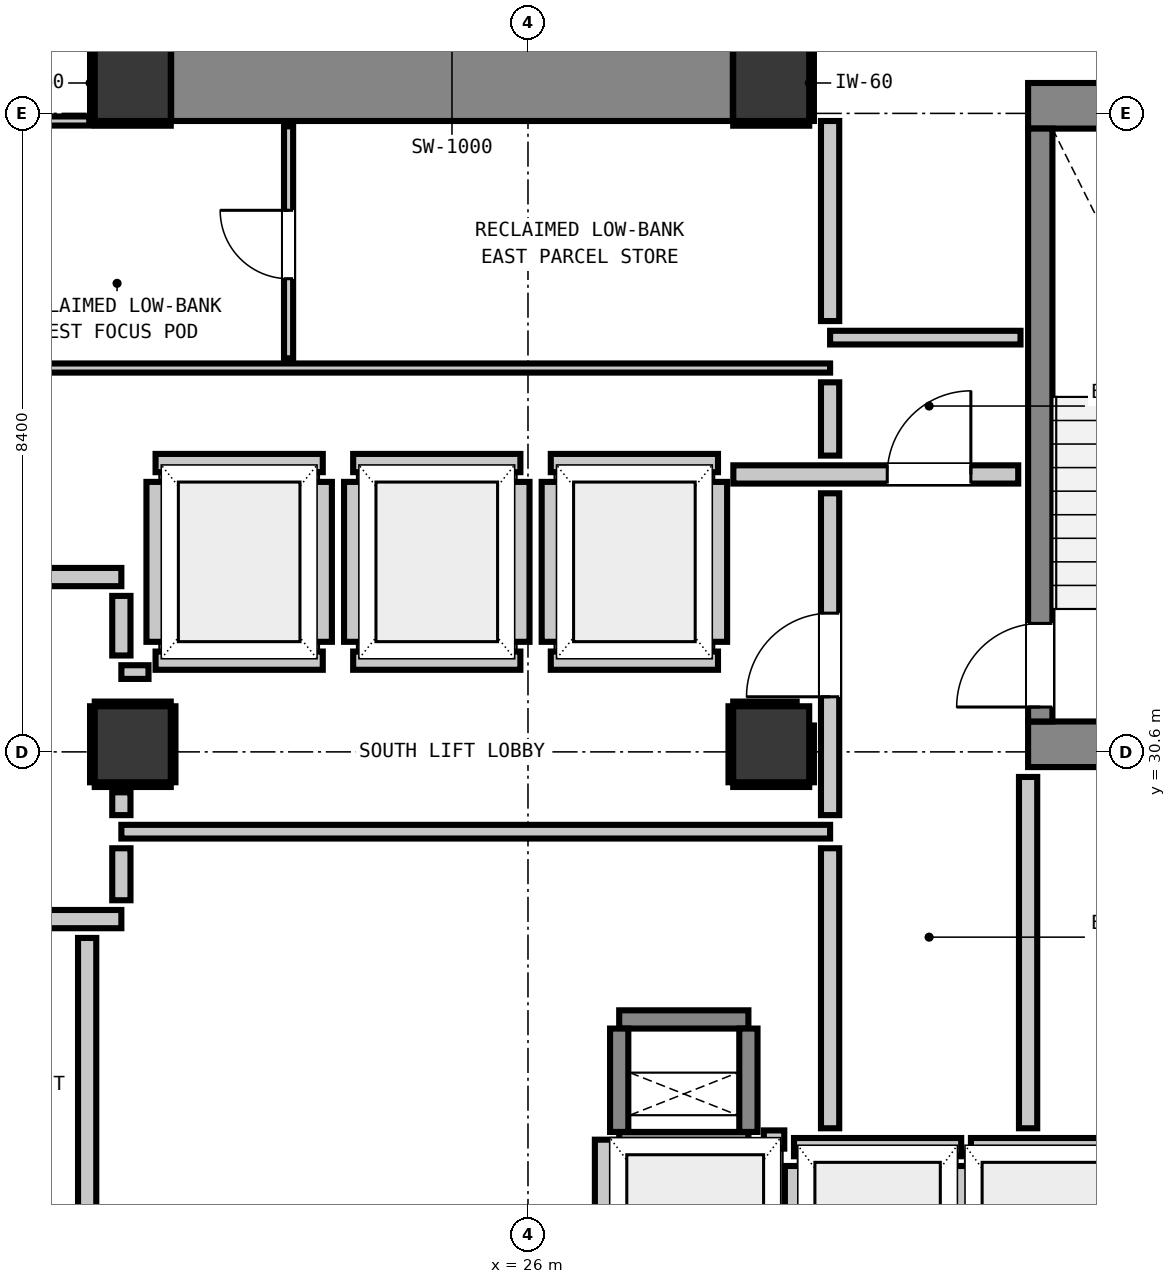
"""IFC4 building model, lengths in metres.
Left out: names, types, materials, properties, quantities, classifications, styles, units other than length and angle.
Written with IfcOpenShell. Run it as: python <this file> out.ifc"""

import sys

from ifc_helpers import new_model, si_unit, direction, frame, frame_2d, origin, origin_2d, place, context, subcontext, project, spatial, rectangle, extrude, element, fill, save


model = new_model("IFC4")
c1 = context("Model", 3, precision=1e-05, world=origin(), true_north=direction((0.0, 1.0)))
c2 = subcontext(c1, "Body", "Model", "MODEL_VIEW")
j1 = project(units=[si_unit("LENGTHUNIT", "METRE"), si_unit("PLANEANGLEUNIT", "RADIAN")], contexts=[c1])
p1 = place(None, origin())
s1 = spatial("IfcSite", under=j1, at=p1, CompositionType="ELEMENT")
p2 = place(p1, origin())
s2 = spatial("IfcBuilding", under=s1, at=p2, CompositionType="ELEMENT")
p3 = place(p2, frame((0.0, 0.0, 155.88)))
s3 = spatial("IfcBuildingStorey", under=s2, at=p3, CompositionType="ELEMENT", Elevation=155.88)
for number, where, z_axis, x_axis in (
    (1, (20.8, 39.4, 0.0), (0.0, 0.0, 1.0), (1.0, 0.0, 0.0)),
    (2, (29.2, 39.4, 0.0), (0.0, 0.0, 1.0), (1.0, 0.0, 0.0)),
):
    element("IfcColumn", number, at=place(p3, frame(where, z_axis=z_axis, x_axis=x_axis)), inside=s3, PredefinedType="COLUMN", context=c2, shape_type="SweptSolid", body=[
        extrude(rectangle(XDim=1.0, YDim=1.0, at=origin_2d()), origin(), (0.0, 0.0, 1.0), 3.32),
    ])
p4 = place(p3, frame((32.58, 39.1, 0.0), z_axis=(0.0, 0.0, 1.0), x_axis=(1.0, 0.0, 0.0)))
e3 = element("IfcWall", 3, at=p4, inside=s3, PredefinedType="SHEAR", context=c2, shape_type="SweptSolid", body=[
    extrude(rectangle(XDim=4.08, YDim=0.6, at=frame_2d((2.04, 0.0))), origin(), (0.0, 0.0, 1.0), 3.32),
])
p5 = place(p3, frame((32.58, 30.7, 0.0), z_axis=(0.0, 0.0, 1.0), x_axis=(1.0, 0.0, 0.0)))
e4 = element("IfcWall", 4, at=p5, inside=s3, PredefinedType="SHEAR", context=c2, shape_type="SweptSolid", body=[
    extrude(rectangle(XDim=3.415, YDim=0.6, at=frame_2d((1.708, 0.0))), origin(), (0.0, 0.0, 1.0), 3.32),
])
p6 = place(p3, frame((21.305, 39.4, 0.0), z_axis=(0.0, 0.0, 1.0), x_axis=(1.0, 0.0, 0.0)))
e5 = element("IfcWall", 5, at=p6, inside=s3, PredefinedType="SHEAR", context=c2, shape_type="SweptSolid", body=[
    extrude(rectangle(XDim=7.39, YDim=1.0, at=frame_2d((3.695, 0.0))), origin(), (0.0, 0.0, 1.0), 3.32),
])
p7 = place(p3, frame((32.74, 31.0, 0.0), z_axis=(0.0, 0.0, 1.0), x_axis=(0.0, 1.0, 0.0)))
e6 = element("IfcWall", 6, at=p7, inside=s3, PredefinedType="SHEAR", context=c2, shape_type="SweptSolid", body=[
    extrude(rectangle(XDim=7.8, YDim=0.32, at=frame_2d((3.9, 0.0))), origin(), (0.0, 0.0, 1.0), 3.32),
])
p8 = place(p7, frame((0.19, 0.0, 0.0)))
e7 = element("IfcOpeningElement", 7, at=p8, cuts=e6, PredefinedType="OPENING", context=c2, shape_type="SweptSolid", body=[
    extrude(rectangle(XDim=1.1, YDim=2.15, at=frame_2d((0.55, 1.075))), frame((0.0, 0.17, 0.0), z_axis=(0.0, -1.0, 0.0), x_axis=(1.0, 0.0, 0.0)), (0.0, 0.0, 1.0), 0.34),
])
for number, where, z_axis, x_axis in (
    (8, (27.2, 25.48, 0.0), (0.0, 0.0, 1.0), (1.0, 0.0, 0.0)),
    (9, (27.2, 27.08, 0.0), (0.0, 0.0, 1.0), (1.0, 0.0, 0.0)),
):
    element("IfcWall", number, at=place(p3, frame(where, z_axis=z_axis, x_axis=x_axis)), inside=s3, PredefinedType="SHEAR", context=c2, shape_type="SweptSolid", body=[
        extrude(rectangle(XDim=1.7, YDim=0.24, at=frame_2d((0.85, 0.0))), origin(), (0.0, 0.0, 1.0), 3.32),
    ])
for number, where, z_axis, x_axis in (
    (10, (27.2, 25.6, 0.0), (0.0, 0.0, 1.0), (0.0, 1.0, 0.0)),
    (11, (28.9, 25.6, 0.0), (0.0, 0.0, 1.0), (0.0, 1.0, 0.0)),
):
    element("IfcWall", number, at=place(p3, frame(where, z_axis=z_axis, x_axis=x_axis)), inside=s3, PredefinedType="SHEAR", context=c2, shape_type="SweptSolid", body=[
        extrude(rectangle(XDim=1.36, YDim=0.24, at=frame_2d((0.68, 0.0))), origin(), (0.0, 0.0, 1.0), 3.32),
    ])
for number, where, z_axis, x_axis in (
    (12, (20.8, 30.7, 0.0), (0.0, 0.0, 1.0), (1.0, 0.0, 0.0)),
    (13, (29.2, 30.7, 0.0), (0.0, 0.0, 1.0), (1.0, 0.0, 0.0)),
):
    element("IfcColumn", number, at=place(p3, frame(where, z_axis=z_axis, x_axis=x_axis)), inside=s3, PredefinedType="COLUMN", context=c2, shape_type="SweptSolid", body=[
        extrude(rectangle(XDim=1.0, YDim=1.0, at=origin_2d()), origin(), (0.0, 0.0, 1.0), 3.32),
    ])
for number, where, z_axis, x_axis in (
    (14, (21.1, 31.8, 0.0), (0.0, 0.0, 1.0), (1.0, 0.0, 0.0)),
    (15, (21.1, 34.4, 0.0), (0.0, 0.0, 1.0), (1.0, 0.0, 0.0)),
):
    element("IfcWall", number, at=place(p3, frame(where, z_axis=z_axis, x_axis=x_axis)), inside=s3, PredefinedType="PARTITIONING", context=c2, shape_type="SweptSolid", body=[
        extrude(rectangle(XDim=2.2, YDim=0.24, at=frame_2d((1.1, 0.0))), origin(), (0.0, 0.0, 1.0), 3.08),
    ])
p9 = place(p3, frame((21.1, 32.048, 0.0), z_axis=(0.0, 0.0, 1.0), x_axis=(0.0, 1.0, 0.0)))
e16 = element("IfcWall", 16, at=p9, inside=s3, PredefinedType="PARTITIONING", context=c2, shape_type="SweptSolid", body=[
    extrude(rectangle(XDim=2.104, YDim=0.24, at=frame_2d((1.052, 0.0))), origin(), (0.0, 0.0, 1.0), 2.315),
])
p10 = place(p3, frame((23.3, 32.048, 0.0), z_axis=(0.0, 0.0, 1.0), x_axis=(0.0, 1.0, 0.0)))
e17 = element("IfcWall", 17, at=p10, inside=s3, PredefinedType="PARTITIONING", context=c2, shape_type="SweptSolid", body=[
    extrude(rectangle(XDim=2.104, YDim=0.24, at=frame_2d((1.052, 0.0))), origin(), (0.0, 0.0, 1.0), 3.08),
])
for number, where, z_axis, x_axis in (
    (18, (23.7, 31.8, 0.0), (0.0, 0.0, 1.0), (1.0, 0.0, 0.0)),
    (19, (23.7, 34.4, 0.0), (0.0, 0.0, 1.0), (1.0, 0.0, 0.0)),
):
    element("IfcWall", number, at=place(p3, frame(where, z_axis=z_axis, x_axis=x_axis)), inside=s3, PredefinedType="PARTITIONING", context=c2, shape_type="SweptSolid", body=[
        extrude(rectangle(XDim=2.2, YDim=0.24, at=frame_2d((1.1, 0.0))), origin(), (0.0, 0.0, 1.0), 3.08),
    ])
for number, where, z_axis, x_axis in (
    (20, (23.7, 32.048, 0.0), (0.0, 0.0, 1.0), (0.0, 1.0, 0.0)),
    (21, (25.9, 32.048, 0.0), (0.0, 0.0, 1.0), (0.0, 1.0, 0.0)),
):
    element("IfcWall", number, at=place(p3, frame(where, z_axis=z_axis, x_axis=x_axis)), inside=s3, PredefinedType="PARTITIONING", context=c2, shape_type="SweptSolid", body=[
        extrude(rectangle(XDim=2.104, YDim=0.24, at=frame_2d((1.052, 0.0))), origin(), (0.0, 0.0, 1.0), 3.08),
    ])
for number, where, z_axis, x_axis in (
    (22, (26.3, 31.8, 0.0), (0.0, 0.0, 1.0), (1.0, 0.0, 0.0)),
    (23, (26.3, 34.4, 0.0), (0.0, 0.0, 1.0), (1.0, 0.0, 0.0)),
):
    element("IfcWall", number, at=place(p3, frame(where, z_axis=z_axis, x_axis=x_axis)), inside=s3, PredefinedType="PARTITIONING", context=c2, shape_type="SweptSolid", body=[
        extrude(rectangle(XDim=2.2, YDim=0.24, at=frame_2d((1.1, 0.0))), origin(), (0.0, 0.0, 1.0), 3.08),
    ])
for number, where, z_axis, x_axis in (
    (24, (26.3, 32.048, 0.0), (0.0, 0.0, 1.0), (0.0, 1.0, 0.0)),
    (25, (28.5, 32.048, 0.0), (0.0, 0.0, 1.0), (0.0, 1.0, 0.0)),
):
    element("IfcWall", number, at=place(p3, frame(where, z_axis=z_axis, x_axis=x_axis)), inside=s3, PredefinedType="PARTITIONING", context=c2, shape_type="SweptSolid", body=[
        extrude(rectangle(XDim=2.104, YDim=0.24, at=frame_2d((1.052, 0.0))), origin(), (0.0, 0.0, 1.0), 3.08),
    ])
p11 = place(p3, frame((29.5, 25.4, 0.0), z_axis=(0.0, 0.0, 1.0), x_axis=(1.0, 0.0, 0.0)))
e26 = element("IfcWall", 26, at=p11, inside=s3, PredefinedType="PARTITIONING", context=c2, shape_type="SweptSolid", body=[
    extrude(rectangle(XDim=2.2, YDim=0.24, at=frame_2d((1.1, 0.0))), origin(), (0.0, 0.0, 1.0), 3.08),
])
p12 = place(p3, frame((29.5, 22.632, 0.0), z_axis=(0.0, 0.0, 1.0), x_axis=(0.0, 1.0, 0.0)))
e27 = element("IfcWall", 27, at=p12, inside=s3, PredefinedType="PARTITIONING", context=c2, shape_type="SweptSolid", body=[
    extrude(rectangle(XDim=2.52, YDim=0.24, at=frame_2d((1.26, 0.0))), origin(), (0.0, 0.0, 1.0), 2.315),
])
p13 = place(p3, frame((31.7, 22.63, 0.0), z_axis=(0.0, 0.0, 1.0), x_axis=(0.0, 1.0, 0.0)))
e28 = element("IfcWall", 28, at=p13, inside=s3, PredefinedType="PARTITIONING", context=c2, shape_type="SweptSolid", body=[
    extrude(rectangle(XDim=2.522, YDim=0.24, at=frame_2d((1.261, 0.0))), origin(), (0.0, 0.0, 1.0), 3.08),
])
p14 = place(p3, frame((31.828, 25.4, 0.0), z_axis=(0.0, 0.0, 1.0), x_axis=(1.0, 0.0, 0.0)))
e29 = element("IfcWall", 29, at=p14, inside=s3, PredefinedType="PARTITIONING", context=c2, shape_type="SweptSolid", body=[
    extrude(rectangle(XDim=2.072, YDim=0.24, at=frame_2d((1.036, 0.0))), origin(), (0.0, 0.0, 1.0), 3.08),
])
p15 = place(p3, frame((29.103, 25.5, 0.0), z_axis=(0.0, 0.0, 1.0), x_axis=(1.0, 0.0, 0.0)))
e30 = element("IfcWall", 30, at=p15, inside=s3, PredefinedType="PARTITIONING", context=c2, shape_type="SweptSolid", body=[
    extrude(rectangle(XDim=0.269, YDim=0.24, at=frame_2d((0.135, 0.0))), origin(), (0.0, 0.0, 1.0), 3.08),
])
p16 = place(p3, frame((27.0, 22.63, 0.0), z_axis=(0.0, 0.0, 1.0), x_axis=(0.0, 1.0, 0.0)))
e31 = element("IfcWall", 31, at=p16, inside=s3, PredefinedType="PARTITIONING", context=c2, shape_type="SweptSolid", body=[
    extrude(rectangle(XDim=2.868, YDim=0.24, at=frame_2d((1.434, 0.0))), origin(), (0.0, 0.0, 1.0), 3.08),
])
p17 = place(p3, frame((17.45, 28.4, 0.0), z_axis=(0.0, 0.0, 1.0), x_axis=(1.0, 0.0, 0.0)))
e32 = element("IfcWall", 32, at=p17, inside=s3, PredefinedType="PARTITIONING", context=c2, shape_type="SweptSolid", body=[
    extrude(rectangle(XDim=3.2, YDim=0.24, at=frame_2d((1.6, 0.0))), origin(), (0.0, 0.0, 1.0), 3.08),
])
p18 = place(p17, frame((0.784, 0.0, 0.0)))
e33 = element("IfcOpeningElement", 33, at=p18, cuts=e32, PredefinedType="OPENING", context=c2, shape_type="SweptSolid", body=[
    extrude(rectangle(XDim=1.1, YDim=2.15, at=frame_2d((0.55, 1.075))), frame((0.0, 0.13, 0.0), z_axis=(0.0, -1.0, 0.0), x_axis=(1.0, 0.0, 0.0)), (0.0, 0.0, 1.0), 0.26),
])
p19 = place(p3, frame((17.45, 32.9, 0.0), z_axis=(0.0, 0.0, 1.0), x_axis=(1.0, 0.0, 0.0)))
e34 = element("IfcWall", 34, at=p19, inside=s3, PredefinedType="PARTITIONING", context=c2, shape_type="SweptSolid", body=[
    extrude(rectangle(XDim=3.2, YDim=0.24, at=frame_2d((1.6, 0.0))), origin(), (0.0, 0.0, 1.0), 3.08),
])
p20 = place(p19, frame((0.159, 0.0, 0.0)))
e35 = element("IfcOpeningElement", 35, at=p20, cuts=e34, PredefinedType="OPENING", context=c2, shape_type="SweptSolid", body=[
    extrude(rectangle(XDim=1.1, YDim=2.15, at=frame_2d((0.55, 1.075))), frame((0.0, 0.13, 0.0), z_axis=(0.0, -1.0, 0.0), x_axis=(1.0, 0.0, 0.0)), (0.0, 0.0, 1.0), 0.26),
])
p21 = place(p3, frame((28.702, 34.25, 0.0), z_axis=(0.0, 0.0, 1.0), x_axis=(1.0, 0.0, 0.0)))
e36 = element("IfcWall", 36, at=p21, inside=s3, PredefinedType="PARTITIONING", context=c2, shape_type="SweptSolid", body=[
    extrude(rectangle(XDim=3.748, YDim=0.24, at=frame_2d((1.874, 0.0))), origin(), (0.0, 0.0, 1.0), 3.08),
])
p22 = place(p21, frame((2.025, 0.0, 0.0)))
e37 = element("IfcOpeningElement", 37, at=p22, cuts=e36, PredefinedType="OPENING", context=c2, shape_type="SweptSolid", body=[
    extrude(rectangle(XDim=1.1, YDim=2.15, at=frame_2d((0.55, 1.075))), frame((0.0, 0.13, 0.0), z_axis=(0.0, -1.0, 0.0), x_axis=(1.0, 0.0, 0.0)), (0.0, 0.0, 1.0), 0.26),
])
p23 = place(p3, frame((20.65, 29.55, 0.0), z_axis=(0.0, 0.0, 1.0), x_axis=(1.0, 0.0, 0.0)))
e38 = element("IfcWall", 38, at=p23, inside=s3, PredefinedType="PARTITIONING", context=c2, shape_type="SweptSolid", body=[
    extrude(rectangle(XDim=9.325, YDim=0.18, at=frame_2d((4.663, 0.0))), origin(), (0.0, 0.0, 1.0), 3.08),
])
p24 = place(p3, frame((20.65, 31.65, 0.0), z_axis=(0.0, 0.0, 1.0), x_axis=(1.0, 0.0, 0.0)))
e39 = element("IfcWall", 39, at=p24, inside=s3, PredefinedType="PARTITIONING", context=c2, shape_type="SweptSolid", body=[
    extrude(rectangle(XDim=0.357, YDim=0.18, at=frame_2d((0.179, 0.0))), origin(), (0.0, 0.0, 1.0), 3.08),
])
p25 = place(p3, frame((29.975, 36.05, 0.0), z_axis=(0.0, 0.0, 1.0), x_axis=(1.0, 0.0, 0.0)))
e40 = element("IfcWall", 40, at=p25, inside=s3, PredefinedType="PARTITIONING", context=c2, shape_type="SweptSolid", body=[
    extrude(rectangle(XDim=2.505, YDim=0.18, at=frame_2d((1.252, 0.0))), origin(), (0.0, 0.0, 1.0), 3.08),
])
p26 = place(p3, frame((18.95, 35.65, 0.0), z_axis=(0.0, 0.0, 1.0), x_axis=(1.0, 0.0, 0.0)))
e41 = element("IfcWall", 41, at=p26, inside=s3, PredefinedType="PARTITIONING", context=c2, shape_type="SweptSolid", body=[
    extrude(rectangle(XDim=11.025, YDim=0.12, at=frame_2d((5.513, 0.0))), origin(), (0.0, 0.0, 1.0), 3.08),
])
p27 = place(p3, frame((18.95, 38.9, 0.0), z_axis=(0.0, 0.0, 1.0), x_axis=(1.0, 0.0, 0.0)))
e42 = element("IfcWall", 42, at=p27, inside=s3, PredefinedType="PARTITIONING", context=c2, shape_type="SweptSolid", body=[
    extrude(rectangle(XDim=1.278, YDim=0.12, at=frame_2d((0.639, 0.0))), origin(), (0.0, 0.0, 1.0), 3.08),
])
p28 = place(p3, frame((20.2, 22.586, 0.0), z_axis=(0.0, 0.0, 1.0), x_axis=(0.0, 1.0, 0.0)))
e43 = element("IfcWall", 43, at=p28, inside=s3, PredefinedType="PARTITIONING", context=c2, shape_type="SweptSolid", body=[
    extrude(rectangle(XDim=5.566, YDim=0.24, at=frame_2d((2.783, 0.0))), origin(), (0.0, 0.0, 1.0), 3.08),
])
p29 = place(p3, frame((20.65, 28.648, 0.0), z_axis=(0.0, 0.0, 1.0), x_axis=(0.0, 1.0, 0.0)))
e44 = element("IfcWall", 44, at=p29, inside=s3, PredefinedType="PARTITIONING", context=c2, shape_type="SweptSolid", body=[
    extrude(rectangle(XDim=0.684, YDim=0.24, at=frame_2d((0.342, 0.0))), origin(), (0.0, 0.0, 1.0), 2.315),
])
p30 = place(p3, frame((20.65, 29.768, 0.0), z_axis=(0.0, 0.0, 1.0), x_axis=(0.0, 1.0, 0.0)))
e45 = element("IfcWall", 45, at=p30, inside=s3, PredefinedType="PARTITIONING", context=c2, shape_type="SweptSolid", body=[
    extrude(rectangle(XDim=0.3, YDim=0.24, at=frame_2d((0.15, 0.0))), origin(), (0.0, 0.0, 1.0), 2.315),
])
p31 = place(p3, frame((20.65, 31.868, 0.0), z_axis=(0.0, 0.0, 1.0), x_axis=(0.0, 1.0, 0.0)))
e46 = element("IfcWall", 46, at=p31, inside=s3, PredefinedType="PARTITIONING", context=c2, shape_type="SweptSolid", body=[
    extrude(rectangle(XDim=0.784, YDim=0.24, at=frame_2d((0.392, 0.0))), origin(), (0.0, 0.0, 1.0), 2.315),
])
p32 = place(p3, frame((29.975, 25.648, 0.0), z_axis=(0.0, 0.0, 1.0), x_axis=(0.0, 1.0, 0.0)))
e47 = element("IfcWall", 47, at=p32, inside=s3, PredefinedType="PARTITIONING", context=c2, shape_type="SweptSolid", body=[
    extrude(rectangle(XDim=3.684, YDim=0.24, at=frame_2d((1.842, 0.0))), origin(), (0.0, 0.0, 1.0), 3.08),
])
p33 = place(p3, frame((29.975, 29.768, 0.0), z_axis=(0.0, 0.0, 1.0), x_axis=(0.0, 1.0, 0.0)))
e48 = element("IfcWall", 48, at=p33, inside=s3, PredefinedType="PARTITIONING", context=c2, shape_type="SweptSolid", body=[
    extrude(rectangle(XDim=4.234, YDim=0.24, at=frame_2d((2.117, 0.0))), origin(), (0.0, 0.0, 1.0), 3.08),
])
p34 = place(p33, frame((1.557, 0.0, 0.0)))
e49 = element("IfcOpeningElement", 49, at=p34, cuts=e48, PredefinedType="OPENING", context=c2, shape_type="SweptSolid", body=[
    extrude(rectangle(XDim=1.1, YDim=2.15, at=frame_2d((0.55, 1.075))), frame((0.0, 0.13, 0.0), z_axis=(0.0, -1.0, 0.0), x_axis=(1.0, 0.0, 0.0)), (0.0, 0.0, 1.0), 0.26),
])
p35 = place(p3, frame((29.975, 34.498, 0.0), z_axis=(0.0, 0.0, 1.0), x_axis=(0.0, 1.0, 0.0)))
e50 = element("IfcWall", 50, at=p35, inside=s3, PredefinedType="PARTITIONING", context=c2, shape_type="SweptSolid", body=[
    extrude(rectangle(XDim=0.964, YDim=0.24, at=frame_2d((0.482, 0.0))), origin(), (0.0, 0.0, 1.0), 3.08),
])
p36 = place(p3, frame((29.975, 36.268, 0.0), z_axis=(0.0, 0.0, 1.0), x_axis=(0.0, 1.0, 0.0)))
e51 = element("IfcWall", 51, at=p36, inside=s3, PredefinedType="PARTITIONING", context=c2, shape_type="SweptSolid", body=[
    extrude(rectangle(XDim=2.632, YDim=0.24, at=frame_2d((1.316, 0.0))), origin(), (0.0, 0.0, 1.0), 3.08),
])
p37 = place(p3, frame((32.58, 25.648, 0.0), z_axis=(0.0, 0.0, 1.0), x_axis=(0.0, 1.0, 0.0)))
e52 = element("IfcWall", 52, at=p37, inside=s3, PredefinedType="PARTITIONING", context=c2, shape_type="SweptSolid", body=[
    extrude(rectangle(XDim=4.622, YDim=0.24, at=frame_2d((2.311, 0.0))), origin(), (0.0, 0.0, 1.0), 3.08),
])
p38 = place(p3, frame((22.85, 35.778, 0.0), z_axis=(0.0, 0.0, 1.0), x_axis=(0.0, 1.0, 0.0)))
e53 = element("IfcWall", 53, at=p38, inside=s3, PredefinedType="PARTITIONING", context=c2, shape_type="SweptSolid", body=[
    extrude(rectangle(XDim=3.052, YDim=0.12, at=frame_2d((1.526, 0.0))), origin(), (0.0, 0.0, 1.0), 3.08),
])
p39 = place(p38, frame((1.047, 0.0, 0.0)))
e54 = element("IfcOpeningElement", 54, at=p39, cuts=e53, PredefinedType="OPENING", context=c2, shape_type="SweptSolid", body=[
    extrude(rectangle(XDim=0.9, YDim=2.1, at=frame_2d((0.45, 1.05))), frame((0.0, 0.07, 0.0), z_axis=(0.0, -1.0, 0.0), x_axis=(1.0, 0.0, 0.0)), (0.0, 0.0, 1.0), 0.14),
])
for number, where, z_axis, x_axis in (
    (55, (20.3, 38.868, 0.0), (0.0, 0.0, 1.0), (1.0, 0.0, 0.0)),
    (56, (20.268, 38.9, 0.0), (0.0, 0.0, 1.0), (0.0, 1.0, 0.0)),
    (57, (28.7, 38.868, 0.0), (0.0, 0.0, 1.0), (1.0, 0.0, 0.0)),
    (58, (29.732, 38.9, 0.0), (0.0, 0.0, 1.0), (0.0, 1.0, 0.0)),
    (59, (20.3, 30.168, 0.0), (0.0, 0.0, 1.0), (1.0, 0.0, 0.0)),
    (60, (20.3, 31.232, 0.0), (0.0, 0.0, 1.0), (1.0, 0.0, 0.0)),
    (61, (20.268, 30.2, 0.0), (0.0, 0.0, 1.0), (0.0, 1.0, 0.0)),
    (62, (21.332, 30.2, 0.0), (0.0, 0.0, 1.0), (0.0, 1.0, 0.0)),
    (63, (28.7, 30.168, 0.0), (0.0, 0.0, 1.0), (1.0, 0.0, 0.0)),
):
    element("IfcWall", number, at=place(p3, frame(where, z_axis=z_axis, x_axis=x_axis)), inside=s3, PredefinedType="PARTITIONING", context=c2, shape_type="SweptSolid", body=[
        extrude(rectangle(XDim=1.0, YDim=0.06, at=frame_2d((0.5, 0.0))), origin(), (0.0, 0.0, 1.0), 1.45),
    ])
p40 = place(p3, frame((28.7, 31.232, 0.0), z_axis=(0.0, 0.0, 1.0), x_axis=(1.0, 0.0, 0.0)))
e64 = element("IfcWall", 64, at=p40, inside=s3, PredefinedType="PARTITIONING", context=c2, shape_type="SweptSolid", body=[
    extrude(rectangle(XDim=0.835, YDim=0.06, at=frame_2d((0.417, 0.0))), origin(), (0.0, 0.0, 1.0), 1.45),
])
p41 = place(p3, frame((28.668, 30.2, 0.0), z_axis=(0.0, 0.0, 1.0), x_axis=(0.0, 1.0, 0.0)))
e65 = element("IfcWall", 65, at=p41, inside=s3, PredefinedType="PARTITIONING", context=c2, shape_type="SweptSolid", body=[
    extrude(rectangle(XDim=1.0, YDim=0.06, at=frame_2d((0.5, 0.0))), origin(), (0.0, 0.0, 1.0), 1.45),
])
p42 = place(p3, frame((29.732, 30.2, 0.0), z_axis=(0.0, 0.0, 1.0), x_axis=(0.0, 1.0, 0.0)))
e66 = element("IfcWall", 66, at=p42, inside=s3, PredefinedType="PARTITIONING", context=c2, shape_type="SweptSolid", body=[
    extrude(rectangle(XDim=0.747, YDim=0.06, at=frame_2d((0.374, 0.0))), origin(), (0.0, 0.0, 1.0), 1.45),
])
p43 = place(p8, origin())
e67 = element("IfcDoor", 67, at=p43, inside=s3, OperationType="SINGLE_SWING_LEFT", PredefinedType="DOOR", context=c2, shape_type="SweptSolid", body=[
    extrude(rectangle(XDim=1.1, YDim=2.15, at=frame_2d((0.55, 1.075))), frame((0.0, 0.025, 0.0), z_axis=(0.0, -1.0, 0.0), x_axis=(1.0, 0.0, 0.0)), (0.0, 0.0, 1.0), 0.05),
])
fill(e7, e67)
p44 = place(p34, origin())
e68 = element("IfcDoor", 68, at=p44, inside=s3, OperationType="SINGLE_SWING_LEFT", PredefinedType="DOOR", context=c2, shape_type="SweptSolid", body=[
    extrude(rectangle(XDim=1.1, YDim=2.15, at=frame_2d((0.55, 1.075))), frame((0.0, 0.025, 0.0), z_axis=(0.0, -1.0, 0.0), x_axis=(1.0, 0.0, 0.0)), (0.0, 0.0, 1.0), 0.05),
])
fill(e49, e68)
p45 = place(p22, origin())
e69 = element("IfcDoor", 69, at=p45, inside=s3, OperationType="SINGLE_SWING_RIGHT", PredefinedType="DOOR", context=c2, shape_type="SweptSolid", body=[
    extrude(rectangle(XDim=1.1, YDim=2.15, at=frame_2d((0.55, 1.075))), frame((0.0, 0.025, 0.0), z_axis=(0.0, -1.0, 0.0), x_axis=(1.0, 0.0, 0.0)), (0.0, 0.0, 1.0), 0.05),
])
fill(e37, e69)
p46 = place(p39, origin())
e70 = element("IfcDoor", 70, at=p46, inside=s3, OperationType="SINGLE_SWING_RIGHT", PredefinedType="DOOR", context=c2, shape_type="SweptSolid", body=[
    extrude(rectangle(XDim=0.9, YDim=2.1, at=frame_2d((0.45, 1.05))), frame((0.0, 0.025, 0.0), z_axis=(0.0, -1.0, 0.0), x_axis=(1.0, 0.0, 0.0)), (0.0, 0.0, 1.0), 0.05),
])
fill(e54, e70)
save(model, sys.argv[1])
